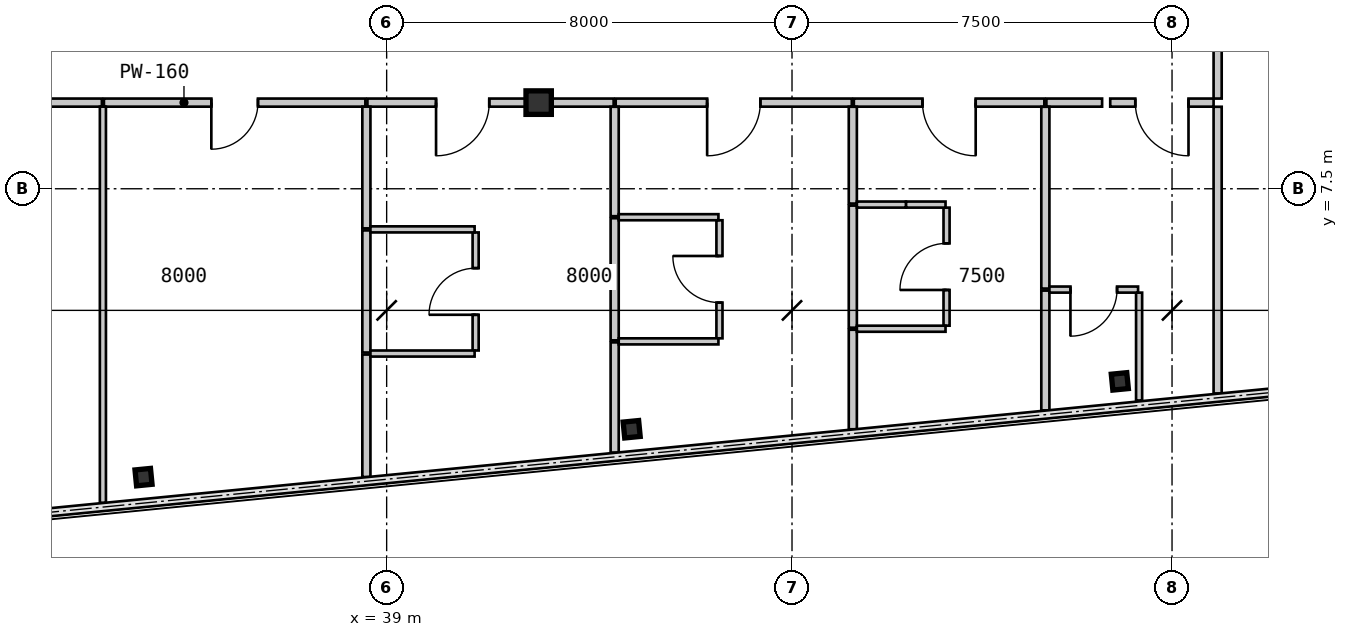
"""IFC4 building model, lengths in metres.
Left out: names, types, materials, properties, quantities, classifications, styles, units other than length and angle.
Written with IfcOpenShell. Run it as: python <this file> out.ifc"""

import sys

from ifc_helpers import new_model, si_unit, direction, frame, frame_2d, origin, origin_2d, place, context, subcontext, project, spatial, rectangle, i_section, extrude, source, transform, mapped, element, fill, save


model = new_model("IFC4")
c1 = context("Model", 3, precision=1e-05, world=origin(), true_north=direction((0.0, 1.0)))
c2 = subcontext(c1, "Body", "Model", "MODEL_VIEW")
j1 = project(units=[si_unit("LENGTHUNIT", "METRE"), si_unit("PLANEANGLEUNIT", "RADIAN")], contexts=[c1])
p1 = place(None, origin())
s1 = spatial("IfcSite", under=j1, at=p1, CompositionType="ELEMENT")
p2 = place(p1, origin())
s2 = spatial("IfcBuilding", under=s1, at=p2, CompositionType="ELEMENT")
p3 = place(p2, frame((0.0, 0.0, 99.75)))
s3 = spatial("IfcBuildingStorey", under=s2, at=p3, CompositionType="ELEMENT", Elevation=99.75)
m1 = source(origin(), c2, "Body", "SweptSolid", [
    extrude(i_section(OverallWidth=0.5, OverallDepth=0.464, WebThickness=0.022, FlangeThickness=0.034, at=origin_2d()), origin(), (0.0, 0.0, 1.0), 3.15),
])
p4 = place(p3, frame((42.0, 9.2, 0.0), z_axis=(0.0, 0.0, 1.0), x_axis=(1.0, 0.0, 0.0)))
e1 = element("IfcColumn", 1, at=p4, inside=s3, PredefinedType="COLUMN", context=c2, shape_type="MappedRepresentation", body=[
    mapped(m1, transform((0.0, 0.0, 0.0), scale=1.0)),
])
m2 = source(origin(), c2, "Body", "SweptSolid", [
    extrude(i_section(OverallWidth=0.307, OverallDepth=0.315, WebThickness=0.012, FlangeThickness=0.019, at=origin_2d()), origin(), (0.0, 0.0, 1.0), 3.15),
])
for number, where, z_axis, x_axis in (
    (2, (34.202, 1.809, 0.0), (0.0, 0.0, 1.0), (0.995, 0.098, 0.0)),
    (3, (43.835, 2.754, 0.0), (0.0, 0.0, 1.0), (0.995, 0.098, 0.0)),
    (4, (53.469, 3.698, 0.0), (0.0, 0.0, 1.0), (0.995, 0.098, 0.0)),
):
    element("IfcColumn", number, at=place(p3, frame(where, z_axis=z_axis, x_axis=x_axis)), inside=s3, PredefinedType="COLUMN", context=c2, shape_type="MappedRepresentation", body=[
        mapped(m2, transform((0.0, 0.0, 0.0), scale=1.0)),
    ])
m3 = source(origin(), c2, "Body", "SweptSolid", [
    extrude(rectangle(XDim=2.04, YDim=0.16, at=frame_2d((1.02, 0.0))), origin(), (0.0, 0.0, 1.0), 2.93),
])
p5 = place(p3, frame((55.32, 9.2, 0.0), z_axis=(0.0, 0.0, 1.0), x_axis=(-1.0, 0.0, 0.0)))
e5 = element("IfcWall", 5, at=p5, inside=s3, PredefinedType="PARTITIONING", context=c2, shape_type="MappedRepresentation", body=[
    mapped(m3, transform((0.0, 0.0, 0.0), scale=1.0)),
])
m4 = source(origin(), c2, "Body", "SweptSolid", [
    extrude(rectangle(XDim=1.05, YDim=2.1, at=frame_2d((0.525, 1.05))), frame((0.0, 0.09, 0.0), z_axis=(0.0, -1.0, 0.0), x_axis=(1.0, 0.0, 0.0)), (0.0, 0.0, 1.0), 0.18),
])
p6 = place(p5, frame((0.495, 0.0, 0.0)))
e6 = element("IfcOpeningElement", 6, at=p6, cuts=e5, PredefinedType="OPENING", context=c2, shape_type="MappedRepresentation", body=[
    mapped(m4, transform((0.0, 0.0, 0.0), scale=1.0)),
])
m5 = source(origin(), c2, "Body", "SweptSolid", [
    extrude(rectangle(XDim=10.2, YDim=0.16, at=frame_2d((5.1, 0.0))), origin(), (0.0, 0.0, 1.0), 2.93),
])
p7 = place(p3, frame((55.4, 19.48, 0.0), z_axis=(0.0, 0.0, 1.0), x_axis=(0.0, -1.0, 0.0)))
e7 = element("IfcWall", 7, at=p7, inside=s3, PredefinedType="PARTITIONING", context=c2, shape_type="MappedRepresentation", body=[
    mapped(m5, transform((0.0, 0.0, 0.0), scale=1.0)),
])
m6 = source(origin(), c2, "Body", "SweptSolid", [
    extrude(rectangle(XDim=0.92, YDim=2.1, at=frame_2d((0.46, 1.05))), frame((0.0, 0.09, 0.0), z_axis=(0.0, -1.0, 0.0), x_axis=(1.0, 0.0, 0.0)), (0.0, 0.0, 1.0), 0.18),
])
p8 = place(p7, frame((4.64, 0.0, 0.0)))
e8 = element("IfcOpeningElement", 8, at=p8, cuts=e7, PredefinedType="OPENING", context=c2, shape_type="MappedRepresentation", body=[
    mapped(m6, transform((0.0, 0.0, 0.0), scale=1.0)),
])
m7 = source(origin(), c2, "Body", "SweptSolid", [
    extrude(rectangle(XDim=5.36, YDim=0.16, at=frame_2d((2.68, 0.0))), origin(), (0.0, 0.0, 1.0), 2.328),
])
p9 = place(p3, frame((33.38, 9.2, 0.0), z_axis=(0.0, 0.0, 1.0), x_axis=(-1.0, 0.0, 0.0)))
e9 = element("IfcWall", 9, at=p9, inside=s3, PredefinedType="PARTITIONING", context=c2, shape_type="MappedRepresentation", body=[
    mapped(m7, transform((0.0, 0.0, 0.0), scale=1.0)),
])
p10 = place(p9, frame((2.22, 0.0, 0.0)))
e10 = element("IfcOpeningElement", 10, at=p10, cuts=e9, PredefinedType="OPENING", context=c2, shape_type="MappedRepresentation", body=[
    mapped(m6, transform((0.0, 0.0, 0.0), scale=1.0)),
])
m8 = source(origin(), c2, "Body", "SweptSolid", [
    extrude(rectangle(XDim=5.16, YDim=0.16, at=frame_2d((2.58, 0.0))), origin(), (0.0, 0.0, 1.0), 2.328),
])
p11 = place(p3, frame((38.58, 9.2, 0.0), z_axis=(0.0, 0.0, 1.0), x_axis=(-1.0, 0.0, 0.0)))
e11 = element("IfcWall", 11, at=p11, inside=s3, PredefinedType="PARTITIONING", context=c2, shape_type="MappedRepresentation", body=[
    mapped(m8, transform((0.0, 0.0, 0.0), scale=1.0)),
])
p12 = place(p11, frame((2.12, 0.0, 0.0)))
e12 = element("IfcOpeningElement", 12, at=p12, cuts=e11, PredefinedType="OPENING", context=c2, shape_type="MappedRepresentation", body=[
    mapped(m6, transform((0.0, 0.0, 0.0), scale=1.0)),
])
m9 = source(origin(), c2, "Body", "SweptSolid", [
    extrude(rectangle(XDim=1.48, YDim=0.16, at=frame_2d((0.74, 0.0))), origin(), (0.0, 0.0, 1.0), 2.93),
])
p13 = place(p3, frame((43.48, 9.2, 0.0), z_axis=(0.0, 0.0, 1.0), x_axis=(-1.0, 0.0, 0.0)))
e13 = element("IfcWall", 13, at=p13, inside=s3, PredefinedType="PARTITIONING", context=c2, shape_type="MappedRepresentation", body=[
    mapped(m9, transform((0.0, 0.0, 0.0), scale=1.0)),
])
m10 = source(origin(), c2, "Body", "SweptSolid", [
    extrude(rectangle(XDim=3.38, YDim=0.16, at=frame_2d((1.69, 0.0))), origin(), (0.0, 0.0, 1.0), 2.328),
])
p14 = place(p3, frame((42.0, 9.2, 0.0), z_axis=(0.0, 0.0, 1.0), x_axis=(-1.0, 0.0, 0.0)))
e14 = element("IfcWall", 14, at=p14, inside=s3, PredefinedType="PARTITIONING", context=c2, shape_type="MappedRepresentation", body=[
    mapped(m10, transform((0.0, 0.0, 0.0), scale=1.0)),
])
p15 = place(p14, frame((0.975, 0.0, 0.0)))
e15 = element("IfcOpeningElement", 15, at=p15, cuts=e14, PredefinedType="OPENING", context=c2, shape_type="MappedRepresentation", body=[
    mapped(m4, transform((0.0, 0.0, 0.0), scale=1.0)),
])
m11 = source(origin(), c2, "Body", "SweptSolid", [
    extrude(rectangle(XDim=4.659, YDim=0.16, at=frame_2d((2.33, 0.0))), origin(), (0.0, 0.0, 1.0), 2.93),
])
p16 = place(p3, frame((48.18, 9.2, 0.0), z_axis=(0.0, 0.0, 1.0), x_axis=(-1.0, 0.0, 0.0)))
e16 = element("IfcWall", 16, at=p16, inside=s3, PredefinedType="PARTITIONING", context=c2, shape_type="MappedRepresentation", body=[
    mapped(m11, transform((0.0, 0.0, 0.0), scale=1.0)),
])
p17 = place(p16, frame((1.805, 0.0, 0.0)))
e17 = element("IfcOpeningElement", 17, at=p17, cuts=e16, PredefinedType="OPENING", context=c2, shape_type="MappedRepresentation", body=[
    mapped(m4, transform((0.0, 0.0, 0.0), scale=1.0)),
])
m12 = source(origin(), c2, "Body", "SweptSolid", [
    extrude(rectangle(XDim=3.76, YDim=0.16, at=frame_2d((1.88, 0.0))), origin(), (0.0, 0.0, 1.0), 2.93),
])
p18 = place(p3, frame((51.98, 9.2, 0.0), z_axis=(0.0, 0.0, 1.0), x_axis=(-1.0, 0.0, 0.0)))
e18 = element("IfcWall", 18, at=p18, inside=s3, PredefinedType="PARTITIONING", context=c2, shape_type="MappedRepresentation", body=[
    mapped(m12, transform((0.0, 0.0, 0.0), scale=1.0)),
])
p19 = place(p18, frame((1.355, 0.0, 0.0)))
e19 = element("IfcOpeningElement", 19, at=p19, cuts=e18, PredefinedType="OPENING", context=c2, shape_type="MappedRepresentation", body=[
    mapped(m4, transform((0.0, 0.0, 0.0), scale=1.0)),
])
m13 = source(origin(), c2, "Body", "SweptSolid", [
    extrude(rectangle(XDim=1.1, YDim=0.16, at=frame_2d((0.55, 0.0))), origin(), (0.0, 0.0, 1.0), 2.93),
])
p20 = place(p3, frame((53.12, 9.2, 0.0), z_axis=(0.0, 0.0, 1.0), x_axis=(-1.0, 0.0, 0.0)))
e20 = element("IfcWall", 20, at=p20, inside=s3, PredefinedType="PARTITIONING", context=c2, shape_type="MappedRepresentation", body=[
    mapped(m13, transform((0.0, 0.0, 0.0), scale=1.0)),
])
m14 = source(origin(), c2, "Body", "SweptSolid", [
    extrude(rectangle(XDim=7.819, YDim=0.12, at=frame_2d((3.91, 0.0))), origin(), (0.0, 0.0, 1.0), 2.93),
])
p21 = place(p3, frame((33.4, 9.12, 0.0), z_axis=(0.0, 0.0, 1.0), x_axis=(0.0, -1.0, 0.0)))
e21 = element("IfcWall", 21, at=p21, inside=s3, PredefinedType="PARTITIONING", context=c2, shape_type="MappedRepresentation", body=[
    mapped(m14, transform((0.0, 0.0, 0.0), scale=1.0)),
])
m15 = source(origin(), c2, "Body", "SweptSolid", [
    extrude(rectangle(XDim=2.417, YDim=0.16, at=frame_2d((1.208, 0.0))), origin(), (0.0, 0.0, 1.0), 2.93),
])
p22 = place(p3, frame((38.6, 4.228, 0.0), z_axis=(0.0, 0.0, 1.0), x_axis=(0.0, -1.0, 0.0)))
e22 = element("IfcWall", 22, at=p22, inside=s3, PredefinedType="PARTITIONING", context=c2, shape_type="MappedRepresentation", body=[
    mapped(m15, transform((0.0, 0.0, 0.0), scale=1.0)),
])
m16 = source(origin(), c2, "Body", "SweptSolid", [
    extrude(rectangle(XDim=2.402, YDim=0.16, at=frame_2d((1.201, 0.0))), origin(), (0.0, 0.0, 1.0), 2.93),
])
p23 = place(p3, frame((38.6, 9.12, 0.0), z_axis=(0.0, 0.0, 1.0), x_axis=(0.0, -1.0, 0.0)))
e23 = element("IfcWall", 23, at=p23, inside=s3, PredefinedType="PARTITIONING", context=c2, shape_type="MappedRepresentation", body=[
    mapped(m16, transform((0.0, 0.0, 0.0), scale=1.0)),
])
m17 = source(origin(), c2, "Body", "SweptSolid", [
    extrude(rectangle(XDim=2.41, YDim=0.16, at=frame_2d((1.205, 0.0))), origin(), (0.0, 0.0, 1.0), 2.93),
])
p24 = place(p3, frame((38.6, 6.678, 0.0), z_axis=(0.0, 0.0, 1.0), x_axis=(0.0, -1.0, 0.0)))
e24 = element("IfcWall", 24, at=p24, inside=s3, PredefinedType="PARTITIONING", context=c2, shape_type="MappedRepresentation", body=[
    mapped(m17, transform((0.0, 0.0, 0.0), scale=1.0)),
])
m18 = source(origin(), c2, "Body", "SweptSolid", [
    extrude(rectangle(XDim=2.33, YDim=0.12, at=frame_2d((1.165, 0.0))), origin(), (0.0, 0.0, 1.0), 2.93),
])
p25 = place(p3, frame((40.756, 4.308, 0.0), z_axis=(0.0, 0.0, 1.0), x_axis=(0.0, 1.0, 0.0)))
e25 = element("IfcWall", 25, at=p25, inside=s3, PredefinedType="PARTITIONING", context=c2, shape_type="MappedRepresentation", body=[
    mapped(m18, transform((0.0, 0.0, 0.0), scale=1.0)),
])
m19 = source(origin(), c2, "Body", "SweptSolid", [
    extrude(rectangle(XDim=0.92, YDim=2.1, at=frame_2d((0.46, 1.05))), frame((0.0, 0.07, 0.0), z_axis=(0.0, -1.0, 0.0), x_axis=(1.0, 0.0, 0.0)), (0.0, 0.0, 1.0), 0.14),
])
p26 = place(p25, frame((0.705, 0.0, 0.0)))
e26 = element("IfcOpeningElement", 26, at=p26, cuts=e25, PredefinedType="OPENING", context=c2, shape_type="MappedRepresentation", body=[
    mapped(m19, transform((0.0, 0.0, 0.0), scale=1.0)),
])
m20 = source(origin(), c2, "Body", "SweptSolid", [
    extrude(rectangle(XDim=2.056, YDim=0.12, at=frame_2d((1.028, 0.0))), origin(), (0.0, 0.0, 1.0), 2.93),
])
for number, where, z_axis, x_axis in (
    (27, (38.68, 4.248, 0.0), (0.0, 0.0, 1.0), (1.0, 0.0, 0.0)),
    (28, (40.736, 6.698, 0.0), (0.0, 0.0, 1.0), (-1.0, 0.0, 0.0)),
):
    element("IfcWall", number, at=place(p3, frame(where, z_axis=z_axis, x_axis=x_axis)), inside=s3, PredefinedType="PARTITIONING", context=c2, shape_type="MappedRepresentation", body=[
        mapped(m20, transform((0.0, 0.0, 0.0), scale=1.0)),
    ])
m21 = source(origin(), c2, "Body", "SweptSolid", [
    extrude(rectangle(XDim=2.175, YDim=0.16, at=frame_2d((1.087, 0.0))), origin(), (0.0, 0.0, 1.0), 2.93),
])
p27 = place(p3, frame((43.5, 4.468, 0.0), z_axis=(0.0, 0.0, 1.0), x_axis=(0.0, -1.0, 0.0)))
e29 = element("IfcWall", 29, at=p27, inside=s3, PredefinedType="PARTITIONING", context=c2, shape_type="MappedRepresentation", body=[
    mapped(m21, transform((0.0, 0.0, 0.0), scale=1.0)),
])
m22 = source(origin(), c2, "Body", "SweptSolid", [
    extrude(rectangle(XDim=2.159, YDim=0.16, at=frame_2d((1.08, 0.0))), origin(), (0.0, 0.0, 1.0), 2.93),
])
p28 = place(p3, frame((43.5, 9.118, 0.0), z_axis=(0.0, 0.0, 1.0), x_axis=(0.0, -1.0, 0.0)))
e30 = element("IfcWall", 30, at=p28, inside=s3, PredefinedType="PARTITIONING", context=c2, shape_type="MappedRepresentation", body=[
    mapped(m22, transform((0.0, 0.0, 0.0), scale=1.0)),
])
p29 = place(p3, frame((43.5, 6.918, 0.0), z_axis=(0.0, 0.0, 1.0), x_axis=(0.0, -1.0, 0.0)))
e31 = element("IfcWall", 31, at=p29, inside=s3, PredefinedType="PARTITIONING", context=c2, shape_type="MappedRepresentation", body=[
    mapped(m17, transform((0.0, 0.0, 0.0), scale=1.0)),
])
p30 = place(p3, frame((45.568, 4.548, 0.0), z_axis=(0.0, 0.0, 1.0), x_axis=(0.0, 1.0, 0.0)))
e32 = element("IfcWall", 32, at=p30, inside=s3, PredefinedType="PARTITIONING", context=c2, shape_type="MappedRepresentation", body=[
    mapped(m18, transform((0.0, 0.0, 0.0), scale=1.0)),
])
p31 = place(p30, frame((0.705, 0.0, 0.0)))
e33 = element("IfcOpeningElement", 33, at=p31, cuts=e32, PredefinedType="OPENING", context=c2, shape_type="MappedRepresentation", body=[
    mapped(m19, transform((0.0, 0.0, 0.0), scale=1.0)),
])
m23 = source(origin(), c2, "Body", "SweptSolid", [
    extrude(rectangle(XDim=1.968, YDim=0.12, at=frame_2d((0.984, 0.0))), origin(), (0.0, 0.0, 1.0), 2.93),
])
for number, where, z_axis, x_axis in (
    (34, (43.58, 4.488, 0.0), (0.0, 0.0, 1.0), (1.0, 0.0, 0.0)),
    (35, (45.548, 6.938, 0.0), (0.0, 0.0, 1.0), (-1.0, 0.0, 0.0)),
):
    element("IfcWall", number, at=place(p3, frame(where, z_axis=z_axis, x_axis=x_axis)), inside=s3, PredefinedType="PARTITIONING", context=c2, shape_type="MappedRepresentation", body=[
        mapped(m23, transform((0.0, 0.0, 0.0), scale=1.0)),
    ])
m24 = source(origin(), c2, "Body", "SweptSolid", [
    extrude(rectangle(XDim=1.964, YDim=0.16, at=frame_2d((0.982, 0.0))), origin(), (0.0, 0.0, 1.0), 2.93),
])
p32 = place(p3, frame((48.2, 4.718, 0.0), z_axis=(0.0, 0.0, 1.0), x_axis=(0.0, -1.0, 0.0)))
e36 = element("IfcWall", 36, at=p32, inside=s3, PredefinedType="PARTITIONING", context=c2, shape_type="MappedRepresentation", body=[
    mapped(m24, transform((0.0, 0.0, 0.0), scale=1.0)),
])
m25 = source(origin(), c2, "Body", "SweptSolid", [
    extrude(rectangle(XDim=1.91, YDim=0.16, at=frame_2d((0.955, 0.0))), origin(), (0.0, 0.0, 1.0), 2.93),
])
p33 = place(p3, frame((48.2, 9.118, 0.0), z_axis=(0.0, 0.0, 1.0), x_axis=(0.0, -1.0, 0.0)))
e37 = element("IfcWall", 37, at=p33, inside=s3, PredefinedType="PARTITIONING", context=c2, shape_type="MappedRepresentation", body=[
    mapped(m25, transform((0.0, 0.0, 0.0), scale=1.0)),
])
p34 = place(p3, frame((48.2, 7.167, 0.0), z_axis=(0.0, 0.0, 1.0), x_axis=(0.0, -1.0, 0.0)))
e38 = element("IfcWall", 38, at=p34, inside=s3, PredefinedType="PARTITIONING", context=c2, shape_type="MappedRepresentation", body=[
    mapped(m17, transform((0.0, 0.0, 0.0), scale=1.0)),
])
p35 = place(p3, frame((50.05, 4.798, 0.0), z_axis=(0.0, 0.0, 1.0), x_axis=(0.0, 1.0, 0.0)))
e39 = element("IfcWall", 39, at=p35, inside=s3, PredefinedType="PARTITIONING", context=c2, shape_type="MappedRepresentation", body=[
    mapped(m18, transform((0.0, 0.0, 0.0), scale=1.0)),
])
p36 = place(p35, frame((0.705, 0.0, 0.0)))
e40 = element("IfcOpeningElement", 40, at=p36, cuts=e39, PredefinedType="OPENING", context=c2, shape_type="MappedRepresentation", body=[
    mapped(m19, transform((0.0, 0.0, 0.0), scale=1.0)),
])
m26 = source(origin(), c2, "Body", "SweptSolid", [
    extrude(rectangle(XDim=1.75, YDim=0.12, at=frame_2d((0.875, 0.0))), origin(), (0.0, 0.0, 1.0), 2.93),
])
p37 = place(p3, frame((48.28, 4.738, 0.0), z_axis=(0.0, 0.0, 1.0), x_axis=(1.0, 0.0, 0.0)))
e41 = element("IfcWall", 41, at=p37, inside=s3, PredefinedType="PARTITIONING", context=c2, shape_type="MappedRepresentation", body=[
    mapped(m26, transform((0.0, 0.0, 0.0), scale=1.0)),
])
m27 = source(origin(), c2, "Body", "SweptSolid", [
    extrude(rectangle(XDim=0.782, YDim=0.12, at=frame_2d((0.391, 0.0))), origin(), (0.0, 0.0, 1.0), 2.93),
])
p38 = place(p3, frame((50.03, 7.188, 0.0), z_axis=(0.0, 0.0, 1.0), x_axis=(-1.0, 0.0, 0.0)))
e42 = element("IfcWall", 42, at=p38, inside=s3, PredefinedType="PARTITIONING", context=c2, shape_type="MappedRepresentation", body=[
    mapped(m27, transform((0.0, 0.0, 0.0), scale=1.0)),
])
m28 = source(origin(), c2, "Body", "SweptSolid", [
    extrude(rectangle(XDim=0.968, YDim=0.12, at=frame_2d((0.484, 0.0))), origin(), (0.0, 0.0, 1.0), 2.47),
])
p39 = place(p3, frame((49.248, 7.188, 0.0), z_axis=(0.0, 0.0, 1.0), x_axis=(-1.0, 0.0, 0.0)))
e43 = element("IfcWall", 43, at=p39, inside=s3, PredefinedType="PARTITIONING", context=c2, shape_type="MappedRepresentation", body=[
    mapped(m28, transform((0.0, 0.0, 0.0), scale=1.0)),
])
m29 = source(origin(), c2, "Body", "SweptSolid", [
    extrude(rectangle(XDim=3.587, YDim=0.16, at=frame_2d((1.794, 0.0))), origin(), (0.0, 0.0, 1.0), 2.93),
])
p40 = place(p3, frame((52.0, 9.118, 0.0), z_axis=(0.0, 0.0, 1.0), x_axis=(0.0, -1.0, 0.0)))
e44 = element("IfcWall", 44, at=p40, inside=s3, PredefinedType="PARTITIONING", context=c2, shape_type="MappedRepresentation", body=[
    mapped(m29, transform((0.0, 0.0, 0.0), scale=1.0)),
])
m30 = source(origin(), c2, "Body", "SweptSolid", [
    extrude(rectangle(XDim=2.364, YDim=0.16, at=frame_2d((1.182, 0.0))), origin(), (0.0, 0.0, 1.0), 2.93),
])
p41 = place(p3, frame((52.0, 5.49, 0.0), z_axis=(0.0, 0.0, 1.0), x_axis=(0.0, -1.0, 0.0)))
e45 = element("IfcWall", 45, at=p41, inside=s3, PredefinedType="PARTITIONING", context=c2, shape_type="MappedRepresentation", body=[
    mapped(m30, transform((0.0, 0.0, 0.0), scale=1.0)),
])
m31 = source(origin(), c2, "Body", "SweptSolid", [
    extrude(rectangle(XDim=2.128, YDim=0.12, at=frame_2d((1.064, 0.0))), origin(), (0.0, 0.0, 1.0), 2.93),
])
p42 = place(p3, frame((53.85, 3.322, 0.0), z_axis=(0.0, 0.0, 1.0), x_axis=(0.0, 1.0, 0.0)))
e46 = element("IfcWall", 46, at=p42, inside=s3, PredefinedType="PARTITIONING", context=c2, shape_type="MappedRepresentation", body=[
    mapped(m31, transform((0.0, 0.0, 0.0), scale=1.0)),
])
p43 = place(p3, frame((53.83, 5.51, 0.0), z_axis=(0.0, 0.0, 1.0), x_axis=(-1.0, 0.0, 0.0)))
e47 = element("IfcWall", 47, at=p43, inside=s3, PredefinedType="PARTITIONING", context=c2, shape_type="MappedRepresentation", body=[
    mapped(m26, transform((0.0, 0.0, 0.0), scale=1.0)),
])
p44 = place(p43, frame((0.415, 0.0, 0.0)))
e48 = element("IfcOpeningElement", 48, at=p44, cuts=e47, PredefinedType="OPENING", context=c2, shape_type="MappedRepresentation", body=[
    mapped(m19, transform((0.0, 0.0, 0.0), scale=1.0)),
])
m32 = source(origin(), c2, "Body", "SweptSolid", [
    extrude(rectangle(XDim=5.658, YDim=0.16, at=frame_2d((2.829, 0.0))), origin(), (0.0, 0.0, 1.0), 2.93),
])
p45 = place(p3, frame((55.4, 9.118, 0.0), z_axis=(0.0, 0.0, 1.0), x_axis=(0.0, -1.0, 0.0)))
e49 = element("IfcWall", 49, at=p45, inside=s3, PredefinedType="PARTITIONING", context=c2, shape_type="MappedRepresentation", body=[
    mapped(m32, transform((0.0, 0.0, 0.0), scale=1.0)),
])
m33 = source(origin(), c2, "Body", "SweptSolid", [
    extrude(rectangle(XDim=1.05, YDim=2.1, at=frame_2d((0.525, 1.05))), frame((0.0, 0.025, 0.0), z_axis=(0.0, -1.0, 0.0), x_axis=(1.0, 0.0, 0.0)), (0.0, 0.0, 1.0), 0.05),
])
p46 = place(p6, origin())
e50 = element("IfcDoor", 50, at=p46, inside=s3, OperationType="SINGLE_SWING_LEFT", PredefinedType="DOOR", context=c2, shape_type="MappedRepresentation", body=[
    mapped(m33, transform((0.0, 0.0, 0.0), scale=1.0)),
])
fill(e6, e50)
m34 = source(origin(), c2, "Body", "SweptSolid", [
    extrude(rectangle(XDim=0.92, YDim=2.1, at=frame_2d((0.46, 1.05))), frame((0.0, 0.025, 0.0), z_axis=(0.0, -1.0, 0.0), x_axis=(1.0, 0.0, 0.0)), (0.0, 0.0, 1.0), 0.05),
])
p47 = place(p12, origin())
e51 = element("IfcDoor", 51, at=p47, inside=s3, OperationType="SINGLE_SWING_RIGHT", PredefinedType="DOOR", context=c2, shape_type="MappedRepresentation", body=[
    mapped(m34, transform((0.0, 0.0, 0.0), scale=1.0)),
])
fill(e12, e51)
p48 = place(p15, origin())
e52 = element("IfcDoor", 52, at=p48, inside=s3, OperationType="SINGLE_SWING_RIGHT", PredefinedType="DOOR", context=c2, shape_type="MappedRepresentation", body=[
    mapped(m33, transform((0.0, 0.0, 0.0), scale=1.0)),
])
fill(e15, e52)
p49 = place(p17, origin())
e53 = element("IfcDoor", 53, at=p49, inside=s3, OperationType="SINGLE_SWING_RIGHT", PredefinedType="DOOR", context=c2, shape_type="MappedRepresentation", body=[
    mapped(m33, transform((0.0, 0.0, 0.0), scale=1.0)),
])
fill(e17, e53)
p50 = place(p19, origin())
e54 = element("IfcDoor", 54, at=p50, inside=s3, OperationType="SINGLE_SWING_LEFT", PredefinedType="DOOR", context=c2, shape_type="MappedRepresentation", body=[
    mapped(m33, transform((0.0, 0.0, 0.0), scale=1.0)),
])
fill(e19, e54)
p51 = place(p26, origin())
e55 = element("IfcDoor", 55, at=p51, inside=s3, OperationType="SINGLE_SWING_LEFT", PredefinedType="DOOR", context=c2, shape_type="MappedRepresentation", body=[
    mapped(m34, transform((0.0, 0.0, 0.0), scale=1.0)),
])
fill(e26, e55)
p52 = place(p31, origin())
e56 = element("IfcDoor", 56, at=p52, inside=s3, OperationType="SINGLE_SWING_RIGHT", PredefinedType="DOOR", context=c2, shape_type="MappedRepresentation", body=[
    mapped(m34, transform((0.0, 0.0, 0.0), scale=1.0)),
])
fill(e33, e56)
p53 = place(p36, origin())
e57 = element("IfcDoor", 57, at=p53, inside=s3, OperationType="SINGLE_SWING_LEFT", PredefinedType="DOOR", context=c2, shape_type="MappedRepresentation", body=[
    mapped(m34, transform((0.0, 0.0, 0.0), scale=1.0)),
])
fill(e40, e57)
p54 = place(p44, origin())
e58 = element("IfcDoor", 58, at=p54, inside=s3, OperationType="SINGLE_SWING_RIGHT", PredefinedType="DOOR", context=c2, shape_type="MappedRepresentation", body=[
    mapped(m34, transform((0.0, 0.0, 0.0), scale=1.0)),
])
fill(e48, e58)
save(model, sys.argv[1])
